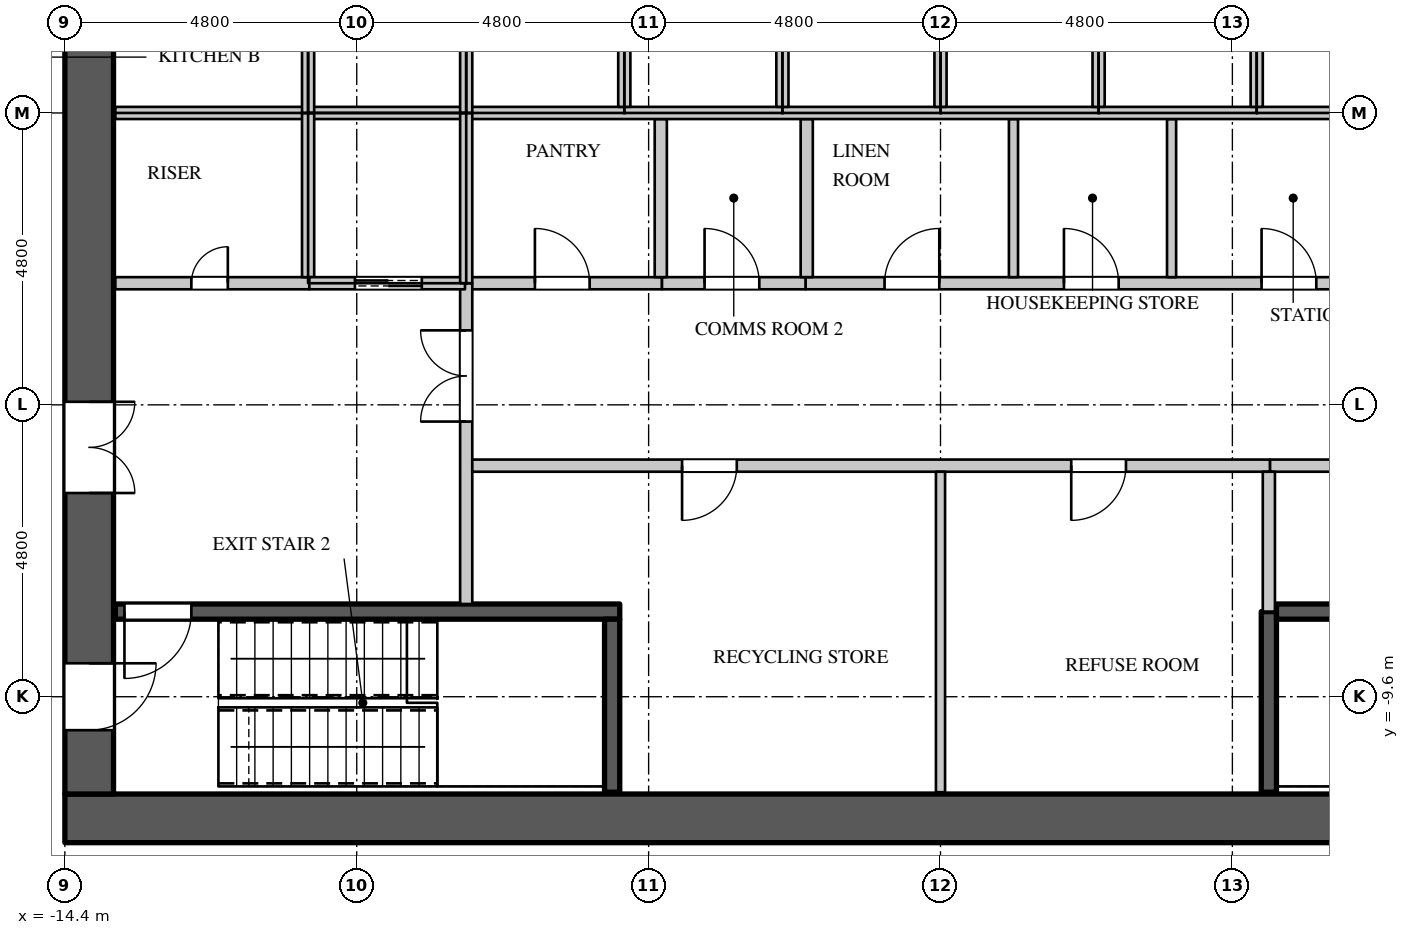
"""IFC4 building model, lengths in metres.
Left out: names, types, materials, properties, quantities, classifications, styles, units other than length and angle.
Written with IfcOpenShell. Run it as: python <this file> out.ifc"""

import sys

from ifc_helpers import new_model, si_unit, direction, frame, frame_2d, origin, place, context, subcontext, project, spatial, rectangle, extrude, element, fill, save


model = new_model("IFC4")
c1 = context("Model", 3, precision=1e-05, world=origin(), true_north=direction((0.0, 1.0)))
c2 = subcontext(c1, "Body", "Model", "MODEL_VIEW")
j1 = project(units=[si_unit("LENGTHUNIT", "METRE"), si_unit("PLANEANGLEUNIT", "RADIAN")], contexts=[c1])
p1 = place(None, origin())
s1 = spatial("IfcSite", under=j1, at=p1, CompositionType="ELEMENT")
p2 = place(p1, origin())
s2 = spatial("IfcBuilding", under=s1, at=p2, CompositionType="ELEMENT")
p3 = place(p2, frame((0.0, 0.0, 110.7)))
s3 = spatial("IfcBuildingStorey", under=s2, at=p3, CompositionType="ELEMENT", Elevation=110.7)
p4 = place(p3, frame((-14.4, -11.6, 0.0), z_axis=(0.0, 0.0, 1.0), x_axis=(1.0, 0.0, 0.0)))
e1 = element("IfcWall", 1, at=p4, inside=s3, PredefinedType="SHEAR", context=c2, shape_type="SweptSolid", body=[
    extrude(rectangle(XDim=28.8, YDim=0.8, at=frame_2d((14.4, 0.0))), origin(), (0.0, 0.0, 1.0), 4.2),
])
p5 = place(p3, frame((-14.0, -11.2, 0.0), z_axis=(0.0, 0.0, 1.0), x_axis=(0.0, 1.0, 0.0)))
e2 = element("IfcWall", 2, at=p5, inside=s3, PredefinedType="SHEAR", context=c2, shape_type="SweptSolid", body=[
    extrude(rectangle(XDim=22.4, YDim=0.8, at=frame_2d((11.2, 0.0))), origin(), (0.0, 0.0, 1.0), 4.2),
])
p6 = place(p5, frame((20.25, 0.0, 0.0)))
e3 = element("IfcOpeningElement", 3, at=p6, cuts=e2, PredefinedType="OPENING", context=c2, shape_type="SweptSolid", body=[
    extrude(rectangle(XDim=1.1, YDim=2.2, at=frame_2d((0.55, 1.1))), frame((0.0, 0.41, 0.0), z_axis=(0.0, -1.0, 0.0), x_axis=(1.0, 0.0, 0.0)), (0.0, 0.0, 1.0), 0.82),
])
p7 = place(p5, frame((1.05, 0.0, 0.0)))
e4 = element("IfcOpeningElement", 4, at=p7, cuts=e2, PredefinedType="OPENING", context=c2, shape_type="SweptSolid", body=[
    extrude(rectangle(XDim=1.1, YDim=2.2, at=frame_2d((0.55, 1.1))), frame((0.0, 0.41, 0.0), z_axis=(0.0, -1.0, 0.0), x_axis=(1.0, 0.0, 0.0)), (0.0, 0.0, 1.0), 0.82),
])
p8 = place(p5, frame((15.95, 0.0, 0.0)))
e5 = element("IfcOpeningElement", 5, at=p8, cuts=e2, PredefinedType="OPENING", context=c2, shape_type="SweptSolid", body=[
    extrude(rectangle(XDim=1.5, YDim=2.4, at=frame_2d((0.75, 1.2))), frame((0.0, 0.41, 0.0), z_axis=(0.0, -1.0, 0.0), x_axis=(1.0, 0.0, 0.0)), (0.0, 0.0, 1.0), 0.82),
])
p9 = place(p5, frame((4.95, 0.0, 0.0)))
e6 = element("IfcOpeningElement", 6, at=p9, cuts=e2, PredefinedType="OPENING", context=c2, shape_type="SweptSolid", body=[
    extrude(rectangle(XDim=1.5, YDim=2.4, at=frame_2d((0.75, 1.2))), frame((0.0, 0.41, 0.0), z_axis=(0.0, -1.0, 0.0), x_axis=(1.0, 0.0, 0.0)), (0.0, 0.0, 1.0), 0.82),
])
p10 = place(p3, frame((-7.82, -2.8, 0.0), z_axis=(0.0, 0.0, 1.0), x_axis=(1.0, 0.0, 0.0)))
e7 = element("IfcWall", 7, at=p10, inside=s3, PredefinedType="PARTITIONING", context=c2, shape_type="SweptSolid", body=[
    extrude(rectangle(XDim=3.24, YDim=0.2, at=frame_2d((1.62, 0.0))), origin(), (0.0, 0.0, 1.0), 3.95),
])
p11 = place(p10, frame((1.15, 0.0, 0.0)))
e8 = element("IfcOpeningElement", 8, at=p11, cuts=e7, PredefinedType="OPENING", context=c2, shape_type="SweptSolid", body=[
    extrude(rectangle(XDim=0.9, YDim=2.2, at=frame_2d((0.45, 1.1))), frame((0.0, 0.11, 0.0), z_axis=(0.0, -1.0, 0.0), x_axis=(1.0, 0.0, 0.0)), (0.0, 0.0, 1.0), 0.22),
])
p12 = place(p3, frame((-7.8, -8.075, 0.0), z_axis=(0.0, 0.0, 1.0), x_axis=(0.0, 1.0, 0.0)))
e9 = element("IfcWall", 9, at=p12, inside=s3, PredefinedType="PARTITIONING", context=c2, shape_type="SweptSolid", body=[
    extrude(rectangle(XDim=5.275, YDim=0.2, at=frame_2d((2.637, 0.0))), origin(), (0.0, 0.0, 1.0), 3.95),
])
p13 = place(p12, frame((3.0, 0.0, 0.0)))
e10 = element("IfcOpeningElement", 10, at=p13, cuts=e9, PredefinedType="OPENING", context=c2, shape_type="SweptSolid", body=[
    extrude(rectangle(XDim=1.5, YDim=2.4, at=frame_2d((0.75, 1.2))), frame((0.0, 0.11, 0.0), z_axis=(0.0, -1.0, 0.0), x_axis=(1.0, 0.0, 0.0)), (0.0, 0.0, 1.0), 0.22),
])
p14 = place(p3, frame((-7.7, -5.8, 0.0), z_axis=(0.0, 0.0, 1.0), x_axis=(1.0, 0.0, 0.0)))
e11 = element("IfcWall", 11, at=p14, inside=s3, PredefinedType="PARTITIONING", context=c2, shape_type="SweptSolid", body=[
    extrude(rectangle(XDim=13.12, YDim=0.2, at=frame_2d((6.56, 0.0))), origin(), (0.0, 0.0, 1.0), 3.95),
])
p15 = place(p14, frame((3.45, 0.0, 0.0)))
e12 = element("IfcOpeningElement", 12, at=p15, cuts=e11, PredefinedType="OPENING", context=c2, shape_type="SweptSolid", body=[
    extrude(rectangle(XDim=0.9, YDim=2.2, at=frame_2d((0.45, 1.1))), frame((0.0, 0.11, 0.0), z_axis=(0.0, -1.0, 0.0), x_axis=(1.0, 0.0, 0.0)), (0.0, 0.0, 1.0), 0.22),
])
p16 = place(p14, frame((9.85, 0.0, 0.0)))
e13 = element("IfcOpeningElement", 13, at=p16, cuts=e11, PredefinedType="OPENING", context=c2, shape_type="SweptSolid", body=[
    extrude(rectangle(XDim=0.9, YDim=2.2, at=frame_2d((0.45, 1.1))), frame((0.0, 0.11, 0.0), z_axis=(0.0, -1.0, 0.0), x_axis=(1.0, 0.0, 0.0)), (0.0, 0.0, 1.0), 0.22),
])
p17 = place(p3, frame((-2.22, -2.8, 0.0), z_axis=(0.0, 0.0, 1.0), x_axis=(1.0, 0.0, 0.0)))
e14 = element("IfcWall", 14, at=p17, inside=s3, PredefinedType="PARTITIONING", context=c2, shape_type="SweptSolid", body=[
    extrude(rectangle(XDim=10.04, YDim=0.2, at=frame_2d((5.02, 0.0))), origin(), (0.0, 0.0, 1.0), 3.95),
])
p18 = place(p17, frame((1.3, 0.0, 0.0)))
e15 = element("IfcOpeningElement", 15, at=p18, cuts=e14, PredefinedType="OPENING", context=c2, shape_type="SweptSolid", body=[
    extrude(rectangle(XDim=0.9, YDim=2.2, at=frame_2d((0.45, 1.1))), frame((0.0, 0.11, 0.0), z_axis=(0.0, -1.0, 0.0), x_axis=(1.0, 0.0, 0.0)), (0.0, 0.0, 1.0), 0.22),
])
p19 = place(p17, frame((4.25, 0.0, 0.0)))
e16 = element("IfcOpeningElement", 16, at=p19, cuts=e14, PredefinedType="OPENING", context=c2, shape_type="SweptSolid", body=[
    extrude(rectangle(XDim=0.9, YDim=2.2, at=frame_2d((0.45, 1.1))), frame((0.0, 0.11, 0.0), z_axis=(0.0, -1.0, 0.0), x_axis=(1.0, 0.0, 0.0)), (0.0, 0.0, 1.0), 0.22),
])
p20 = place(p17, frame((7.5, 0.0, 0.0)))
e17 = element("IfcOpeningElement", 17, at=p20, cuts=e14, PredefinedType="OPENING", context=c2, shape_type="SweptSolid", body=[
    extrude(rectangle(XDim=0.9, YDim=2.2, at=frame_2d((0.45, 1.1))), frame((0.0, 0.11, 0.0), z_axis=(0.0, -1.0, 0.0), x_axis=(1.0, 0.0, 0.0)), (0.0, 0.0, 1.0), 0.22),
])
p21 = place(p3, frame((0.0, -11.17, 0.0), z_axis=(0.0, 0.0, 1.0), x_axis=(0.0, 1.0, 0.0)))
e18 = element("IfcWall", 18, at=p21, inside=s3, PredefinedType="PARTITIONING", context=c2, shape_type="SweptSolid", body=[
    extrude(rectangle(XDim=5.27, YDim=0.15, at=frame_2d((2.635, 0.0))), origin(), (0.0, 0.0, 1.0), 3.95),
])
for number, where, z_axis, x_axis in (
    (19, (1.2, -2.7, 0.0), (0.0, 0.0, 1.0), (0.0, 1.0, 0.0)),
    (20, (3.8, -2.7, 0.0), (0.0, 0.0, 1.0), (0.0, 1.0, 0.0)),
):
    element("IfcWall", number, at=place(p3, frame(where, z_axis=z_axis, x_axis=x_axis)), inside=s3, PredefinedType="PARTITIONING", context=c2, shape_type="SweptSolid", body=[
        extrude(rectangle(XDim=2.6, YDim=0.15, at=frame_2d((1.3, 0.0))), origin(), (0.0, 0.0, 1.0), 3.95),
    ])
p22 = place(p3, frame((-13.57, -2.8, 0.0), z_axis=(0.0, 0.0, 1.0), x_axis=(1.0, 0.0, 0.0)))
e21 = element("IfcWall", 21, at=p22, inside=s3, PredefinedType="PARTITIONING", context=c2, shape_type="SweptSolid", body=[
    extrude(rectangle(XDim=3.19, YDim=0.2, at=frame_2d((1.595, 0.0))), origin(), (0.0, 0.0, 1.0), 3.95),
])
p23 = place(p22, frame((1.25, 0.0, 0.0)))
e22 = element("IfcOpeningElement", 22, at=p23, cuts=e21, PredefinedType="OPENING", context=c2, shape_type="SweptSolid", body=[
    extrude(rectangle(XDim=0.6, YDim=2.0, at=frame_2d((0.3, 1.0))), frame((0.0, 0.11, 0.0), z_axis=(0.0, -1.0, 0.0), x_axis=(1.0, 0.0, 0.0)), (0.0, 0.0, 1.0), 0.22),
])
p24 = place(p3, frame((-4.58, -2.8, 0.0), z_axis=(0.0, 0.0, 1.0), x_axis=(1.0, 0.0, 0.0)))
e23 = element("IfcWall", 23, at=p24, inside=s3, PredefinedType="PARTITIONING", context=c2, shape_type="SweptSolid", body=[
    extrude(rectangle(XDim=2.36, YDim=0.2, at=frame_2d((1.18, 0.0))), origin(), (0.0, 0.0, 1.0), 3.95),
])
p25 = place(p24, frame((0.7, 0.0, 0.0)))
e24 = element("IfcOpeningElement", 24, at=p25, cuts=e23, PredefinedType="OPENING", context=c2, shape_type="SweptSolid", body=[
    extrude(rectangle(XDim=0.9, YDim=2.2, at=frame_2d((0.45, 1.1))), frame((0.0, 0.11, 0.0), z_axis=(0.0, -1.0, 0.0), x_axis=(1.0, 0.0, 0.0)), (0.0, 0.0, 1.0), 0.22),
])
for number, where, z_axis, x_axis in (
    (25, (-4.6, -2.7, 0.0), (0.0, 0.0, 1.0), (0.0, 1.0, 0.0)),
    (26, (-2.2, -2.7, 0.0), (0.0, 0.0, 1.0), (0.0, 1.0, 0.0)),
):
    element("IfcWall", number, at=place(p3, frame(where, z_axis=z_axis, x_axis=x_axis)), inside=s3, PredefinedType="PARTITIONING", context=c2, shape_type="SweptSolid", body=[
        extrude(rectangle(XDim=2.6, YDim=0.2, at=frame_2d((1.3, 0.0))), origin(), (0.0, 0.0, 1.0), 3.95),
    ])
p26 = place(p3, frame((5.42, -5.8, 0.0), z_axis=(0.0, 0.0, 1.0), x_axis=(1.0, 0.0, 0.0)))
e27 = element("IfcWall", 27, at=p26, inside=s3, PredefinedType="PARTITIONING", context=c2, shape_type="SweptSolid", body=[
    extrude(rectangle(XDim=8.15, YDim=0.2, at=frame_2d((4.075, 0.0))), origin(), (0.0, 0.0, 1.0), 3.95),
])
p27 = place(p26, frame((3.65, 0.0, 0.0)))
e28 = element("IfcOpeningElement", 28, at=p27, cuts=e27, PredefinedType="OPENING", context=c2, shape_type="SweptSolid", body=[
    extrude(rectangle(XDim=0.9, YDim=2.2, at=frame_2d((0.45, 1.1))), frame((0.0, 0.11, 0.0), z_axis=(0.0, -1.0, 0.0), x_axis=(1.0, 0.0, 0.0)), (0.0, 0.0, 1.0), 0.22),
])
p28 = place(p3, frame((5.4, -8.2, 0.0), z_axis=(0.0, 0.0, 1.0), x_axis=(0.0, 1.0, 0.0)))
e29 = element("IfcWall", 29, at=p28, inside=s3, PredefinedType="PARTITIONING", context=c2, shape_type="SweptSolid", body=[
    extrude(rectangle(XDim=2.3, YDim=0.2, at=frame_2d((1.15, 0.0))), origin(), (0.0, 0.0, 1.0), 3.95),
])
p29 = place(p3, frame((-13.57, 0.0, 0.0), z_axis=(0.0, 0.0, 1.0), x_axis=(1.0, 0.0, 0.0)))
e30 = element("IfcWall", 30, at=p29, inside=s3, PredefinedType="PARTITIONING", context=c2, shape_type="SweptSolid", body=[
    extrude(rectangle(XDim=23.97, YDim=0.2, at=frame_2d((11.985, 0.0))), origin(), (0.0, 0.0, 1.0), 3.95),
])
p30 = place(p3, frame((-10.4, -2.7, 0.0), z_axis=(0.0, 0.0, 1.0), x_axis=(0.0, 1.0, 0.0)))
e31 = element("IfcWall", 31, at=p30, inside=s3, PredefinedType="PARTITIONING", context=c2, shape_type="SweptSolid", body=[
    extrude(rectangle(XDim=2.7, YDim=0.2, at=frame_2d((1.35, 0.0))), origin(), (0.0, 0.0, 1.0), 3.95),
])
p31 = place(p3, frame((-10.38, -2.8, 0.0), z_axis=(0.0, 0.0, 1.0), x_axis=(1.0, 0.0, 0.0)))
e32 = element("IfcWall", 32, at=p31, inside=s3, PredefinedType="PARTITIONING", context=c2, shape_type="SweptSolid", body=[
    extrude(rectangle(XDim=2.56, YDim=0.2, at=frame_2d((1.28, 0.0))), origin(), (0.0, 0.0, 1.0), 3.95),
])
p32 = place(p31, frame((0.75, 0.0, 0.0)))
e33 = element("IfcOpeningElement", 33, at=p32, cuts=e32, PredefinedType="OPENING", context=c2, shape_type="SweptSolid", body=[
    extrude(rectangle(XDim=1.1, YDim=2.2, at=frame_2d((0.55, 1.1))), frame((0.0, 0.11, 0.0), z_axis=(0.0, -1.0, 0.0), x_axis=(1.0, 0.0, 0.0)), (0.0, 0.0, 1.0), 0.22),
])
p33 = place(p3, frame((-10.4, 0.0, 0.0), z_axis=(0.0, 0.0, 1.0), x_axis=(0.0, 1.0, 0.0)))
e34 = element("IfcWall", 34, at=p33, inside=s3, PredefinedType="PARTITIONING", context=c2, shape_type="SweptSolid", body=[
    extrude(rectangle(XDim=2.7, YDim=0.2, at=frame_2d((1.35, 0.0))), origin(), (0.0, 0.0, 1.0), 3.95),
])
for number, where, z_axis, x_axis in (
    (35, (-7.8, -2.8, 0.0), (0.0, 0.0, 1.0), (0.0, 1.0, 0.0)),
    (36, (-7.8, 0.0, 0.0), (0.0, 0.0, 1.0), (0.0, 1.0, 0.0)),
):
    element("IfcWall", number, at=place(p3, frame(where, z_axis=z_axis, x_axis=x_axis)), inside=s3, PredefinedType="PARTITIONING", context=c2, shape_type="SweptSolid", body=[
        extrude(rectangle(XDim=2.8, YDim=0.2, at=frame_2d((1.4, 0.0))), origin(), (0.0, 0.0, 1.0), 3.95),
    ])
for number, where, z_axis, x_axis in (
    (37, (-5.2, 0.1, 0.0), (0.0, 0.0, 1.0), (0.0, 1.0, 0.0)),
    (38, (-2.6, 0.1, 0.0), (0.0, 0.0, 1.0), (0.0, 1.0, 0.0)),
    (39, (0.0, 0.1, 0.0), (0.0, 0.0, 1.0), (0.0, 1.0, 0.0)),
    (40, (2.6, 0.1, 0.0), (0.0, 0.0, 1.0), (0.0, 1.0, 0.0)),
    (41, (5.2, 0.1, 0.0), (0.0, 0.0, 1.0), (0.0, 1.0, 0.0)),
):
    element("IfcWall", number, at=place(p3, frame(where, z_axis=z_axis, x_axis=x_axis)), inside=s3, PredefinedType="PARTITIONING", context=c2, shape_type="SweptSolid", body=[
        extrude(rectangle(XDim=2.6, YDim=0.2, at=frame_2d((1.3, 0.0))), origin(), (0.0, 0.0, 1.0), 3.95),
    ])
p34 = place(p3, frame((-13.57, -8.2, 0.0), z_axis=(0.0, 0.0, 1.0), x_axis=(1.0, 0.0, 0.0)))
e42 = element("IfcWall", 42, at=p34, inside=s3, PredefinedType="SHEAR", context=c2, shape_type="SweptSolid", body=[
    extrude(rectangle(XDim=8.295, YDim=0.25, at=frame_2d((4.147, 0.0))), origin(), (0.0, 0.0, 1.0), 3.95),
])
p35 = place(p34, frame((0.15, 0.0, 0.0)))
e43 = element("IfcOpeningElement", 43, at=p35, cuts=e42, PredefinedType="OPENING", context=c2, shape_type="SweptSolid", body=[
    extrude(rectangle(XDim=1.1, YDim=2.2, at=frame_2d((0.55, 1.1))), frame((0.0, 0.135, 0.0), z_axis=(0.0, -1.0, 0.0), x_axis=(1.0, 0.0, 0.0)), (0.0, 0.0, 1.0), 0.27),
])
p36 = place(p3, frame((-5.4, -11.17, 0.0), z_axis=(0.0, 0.0, 1.0), x_axis=(0.0, 1.0, 0.0)))
e44 = element("IfcWall", 44, at=p36, inside=s3, PredefinedType="SHEAR", context=c2, shape_type="SweptSolid", body=[
    extrude(rectangle(XDim=2.845, YDim=0.25, at=frame_2d((1.422, 0.0))), origin(), (0.0, 0.0, 1.0), 3.95),
])
p37 = place(p3, frame((5.4, -11.17, 0.0), z_axis=(0.0, 0.0, 1.0), x_axis=(0.0, 1.0, 0.0)))
e45 = element("IfcWall", 45, at=p37, inside=s3, PredefinedType="SHEAR", context=c2, shape_type="SweptSolid", body=[
    extrude(rectangle(XDim=2.97, YDim=0.25, at=frame_2d((1.485, 0.0))), origin(), (0.0, 0.0, 1.0), 3.95),
])
p38 = place(p3, frame((5.525, -8.2, 0.0), z_axis=(0.0, 0.0, 1.0), x_axis=(1.0, 0.0, 0.0)))
e46 = element("IfcWall", 46, at=p38, inside=s3, PredefinedType="SHEAR", context=c2, shape_type="SweptSolid", body=[
    extrude(rectangle(XDim=8.045, YDim=0.25, at=frame_2d((4.022, 0.0))), origin(), (0.0, 0.0, 1.0), 3.95),
])
p39 = place(p23, origin())
e47 = element("IfcDoor", 47, at=p39, inside=s3, OperationType="SINGLE_SWING_RIGHT", PredefinedType="DOOR", context=c2, shape_type="SweptSolid", body=[
    extrude(rectangle(XDim=0.6, YDim=2.0, at=frame_2d((0.3, 1.0))), frame((0.0, 0.025, 0.0), z_axis=(0.0, -1.0, 0.0), x_axis=(1.0, 0.0, 0.0)), (0.0, 0.0, 1.0), 0.05),
])
fill(e22, e47)
p40 = place(p15, origin())
e48 = element("IfcDoor", 48, at=p40, inside=s3, OperationType="SINGLE_SWING_RIGHT", PredefinedType="DOOR", context=c2, shape_type="SweptSolid", body=[
    extrude(rectangle(XDim=0.9, YDim=2.2, at=frame_2d((0.45, 1.1))), frame((0.0, 0.025, 0.0), z_axis=(0.0, -1.0, 0.0), x_axis=(1.0, 0.0, 0.0)), (0.0, 0.0, 1.0), 0.05),
])
fill(e12, e48)
p41 = place(p16, origin())
e49 = element("IfcDoor", 49, at=p41, inside=s3, OperationType="SINGLE_SWING_RIGHT", PredefinedType="DOOR", context=c2, shape_type="SweptSolid", body=[
    extrude(rectangle(XDim=0.9, YDim=2.2, at=frame_2d((0.45, 1.1))), frame((0.0, 0.025, 0.0), z_axis=(0.0, -1.0, 0.0), x_axis=(1.0, 0.0, 0.0)), (0.0, 0.0, 1.0), 0.05),
])
fill(e13, e49)
p42 = place(p11, origin())
e50 = element("IfcDoor", 50, at=p42, inside=s3, OperationType="SINGLE_SWING_LEFT", PredefinedType="DOOR", context=c2, shape_type="SweptSolid", body=[
    extrude(rectangle(XDim=0.9, YDim=2.2, at=frame_2d((0.45, 1.1))), frame((0.0, 0.025, 0.0), z_axis=(0.0, -1.0, 0.0), x_axis=(1.0, 0.0, 0.0)), (0.0, 0.0, 1.0), 0.05),
])
fill(e8, e50)
p43 = place(p25, origin())
e51 = element("IfcDoor", 51, at=p43, inside=s3, OperationType="SINGLE_SWING_LEFT", PredefinedType="DOOR", context=c2, shape_type="SweptSolid", body=[
    extrude(rectangle(XDim=0.9, YDim=2.2, at=frame_2d((0.45, 1.1))), frame((0.0, 0.025, 0.0), z_axis=(0.0, -1.0, 0.0), x_axis=(1.0, 0.0, 0.0)), (0.0, 0.0, 1.0), 0.05),
])
fill(e24, e51)
p44 = place(p18, origin())
e52 = element("IfcDoor", 52, at=p44, inside=s3, OperationType="SINGLE_SWING_RIGHT", PredefinedType="DOOR", context=c2, shape_type="SweptSolid", body=[
    extrude(rectangle(XDim=0.9, YDim=2.2, at=frame_2d((0.45, 1.1))), frame((0.0, 0.025, 0.0), z_axis=(0.0, -1.0, 0.0), x_axis=(1.0, 0.0, 0.0)), (0.0, 0.0, 1.0), 0.05),
])
fill(e15, e52)
p45 = place(p19, origin())
e53 = element("IfcDoor", 53, at=p45, inside=s3, OperationType="SINGLE_SWING_LEFT", PredefinedType="DOOR", context=c2, shape_type="SweptSolid", body=[
    extrude(rectangle(XDim=0.9, YDim=2.2, at=frame_2d((0.45, 1.1))), frame((0.0, 0.025, 0.0), z_axis=(0.0, -1.0, 0.0), x_axis=(1.0, 0.0, 0.0)), (0.0, 0.0, 1.0), 0.05),
])
fill(e16, e53)
p46 = place(p20, origin())
e54 = element("IfcDoor", 54, at=p46, inside=s3, OperationType="SINGLE_SWING_LEFT", PredefinedType="DOOR", context=c2, shape_type="SweptSolid", body=[
    extrude(rectangle(XDim=0.9, YDim=2.2, at=frame_2d((0.45, 1.1))), frame((0.0, 0.025, 0.0), z_axis=(0.0, -1.0, 0.0), x_axis=(1.0, 0.0, 0.0)), (0.0, 0.0, 1.0), 0.05),
])
fill(e17, e54)
p47 = place(p32, origin())
e55 = element("IfcDoor", 55, at=p47, inside=s3, OperationType="DOUBLE_DOOR_SLIDING", PredefinedType="DOOR", context=c2, shape_type="SweptSolid", body=[
    extrude(rectangle(XDim=1.1, YDim=2.2, at=frame_2d((0.55, 1.1))), frame((0.0, 0.025, 0.0), z_axis=(0.0, -1.0, 0.0), x_axis=(1.0, 0.0, 0.0)), (0.0, 0.0, 1.0), 0.05),
])
fill(e33, e55)
p48 = place(p35, origin())
e56 = element("IfcDoor", 56, at=p48, inside=s3, OperationType="SINGLE_SWING_RIGHT", PredefinedType="DOOR", context=c2, shape_type="SweptSolid", body=[
    extrude(rectangle(XDim=1.1, YDim=2.2, at=frame_2d((0.55, 1.1))), frame((0.0, 0.025, 0.0), z_axis=(0.0, -1.0, 0.0), x_axis=(1.0, 0.0, 0.0)), (0.0, 0.0, 1.0), 0.05),
])
fill(e43, e56)
p49 = place(p13, origin())
e57 = element("IfcDoor", 57, at=p49, inside=s3, OperationType="DOUBLE_DOOR_SINGLE_SWING", PredefinedType="DOOR", context=c2, shape_type="SweptSolid", body=[
    extrude(rectangle(XDim=1.5, YDim=2.4, at=frame_2d((0.75, 1.2))), frame((0.0, 0.025, 0.0), z_axis=(0.0, -1.0, 0.0), x_axis=(1.0, 0.0, 0.0)), (0.0, 0.0, 1.0), 0.05),
])
fill(e10, e57)
p50 = place(p7, origin())
e58 = element("IfcDoor", 58, at=p50, inside=s3, OperationType="SINGLE_SWING_LEFT", PredefinedType="DOOR", context=c2, shape_type="SweptSolid", body=[
    extrude(rectangle(XDim=1.1, YDim=2.2, at=frame_2d((0.55, 1.1))), frame((0.0, -0.345, 0.0), z_axis=(0.0, -1.0, 0.0), x_axis=(1.0, 0.0, 0.0)), (0.0, 0.0, 1.0), 0.05),
])
fill(e4, e58)
p51 = place(p9, origin())
e59 = element("IfcDoor", 59, at=p51, inside=s3, OperationType="DOUBLE_DOOR_SINGLE_SWING", PredefinedType="DOOR", context=c2, shape_type="SweptSolid", body=[
    extrude(rectangle(XDim=1.5, YDim=2.4, at=frame_2d((0.75, 1.2))), frame((0.0, -0.345, 0.0), z_axis=(0.0, -1.0, 0.0), x_axis=(1.0, 0.0, 0.0)), (0.0, 0.0, 1.0), 0.05),
])
fill(e6, e59)
save(model, sys.argv[1])
